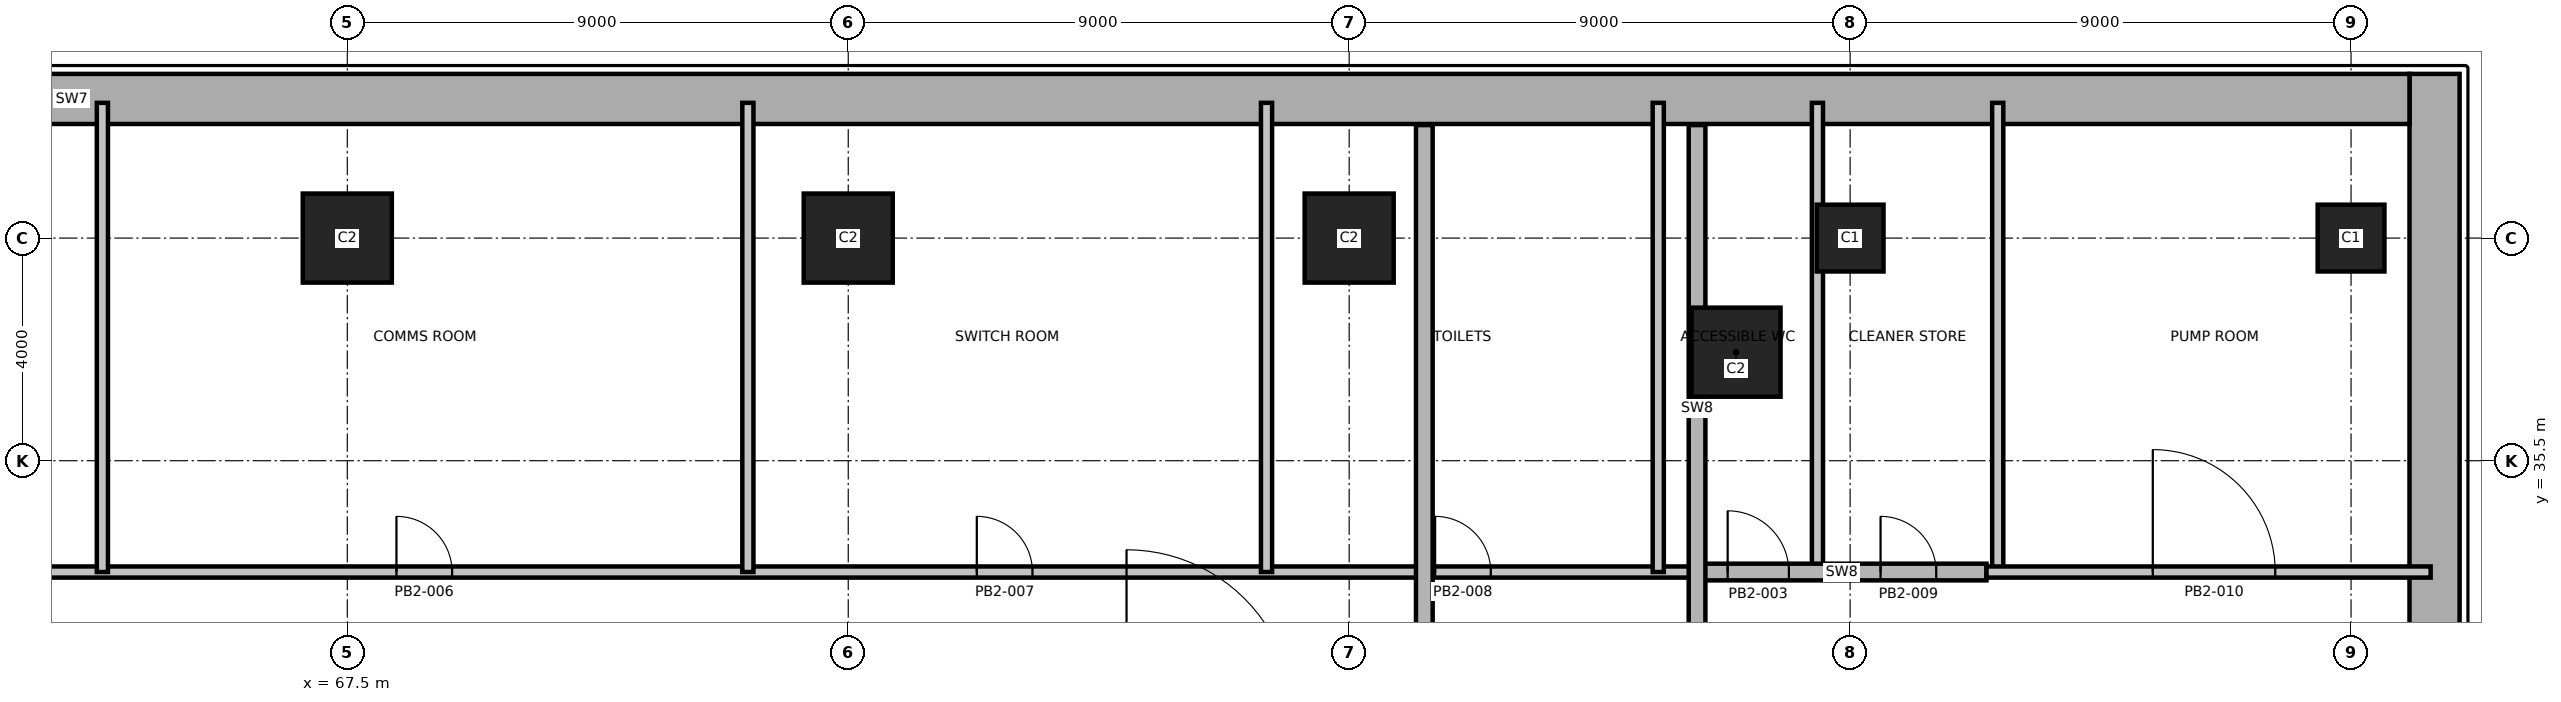
"""IFC4 building model, lengths in metres.
Left out: names, types, materials, properties, quantities, classifications, styles, units other than length and angle.
Written with IfcOpenShell. Run it as: python <this file> out.ifc"""

import sys

from ifc_helpers import new_model, si_unit, direction, frame, frame_2d, origin, origin_2d, place, context, subcontext, project, spatial, rectangle, extrude, element, fill, save


model = new_model("IFC4")
c1 = context("Model", 3, precision=1e-05, world=origin(), true_north=direction((0.0, 1.0)))
c2 = subcontext(c1, "Body", "Model", "MODEL_VIEW")
j1 = project(units=[si_unit("LENGTHUNIT", "METRE"), si_unit("PLANEANGLEUNIT", "RADIAN")], contexts=[c1])
p1 = place(None, origin())
s1 = spatial("IfcSite", under=j1, at=p1, CompositionType="ELEMENT")
p2 = place(p1, origin())
s2 = spatial("IfcBuilding", under=s1, at=p2, CompositionType="ELEMENT")
p3 = place(p2, frame((0.0, 0.0, -9.0)))
s3 = spatial("IfcBuildingStorey", under=s2, at=p3, CompositionType="ELEMENT", Elevation=-9.0)
for number, where, z_axis, x_axis in (
    (1, (67.5, 39.5, 0.0), (0.0, 0.0, 1.0), (1.0, 0.0, 0.0)),
    (2, (76.5, 39.5, 0.0), (0.0, 0.0, 1.0), (1.0, 0.0, 0.0)),
    (3, (85.5, 39.5, 0.0), (0.0, 0.0, 1.0), (1.0, 0.0, 0.0)),
):
    element("IfcColumn", number, at=place(p3, frame(where, z_axis=z_axis, x_axis=x_axis)), inside=s3, PredefinedType="COLUMN", context=c2, shape_type="SweptSolid", body=[
        extrude(rectangle(XDim=1.6, YDim=1.6, at=origin_2d()), origin(), (0.0, 0.0, 1.0), 4.5),
    ])
for number, where, z_axis, x_axis in (
    (4, (94.5, 39.5, 0.0), (0.0, 0.0, 1.0), (1.0, 0.0, 0.0)),
    (5, (103.5, 39.5, 0.0), (0.0, 0.0, 1.0), (1.0, 0.0, 0.0)),
):
    element("IfcColumn", number, at=place(p3, frame(where, z_axis=z_axis, x_axis=x_axis)), inside=s3, PredefinedType="COLUMN", context=c2, shape_type="SweptSolid", body=[
        extrude(rectangle(XDim=1.2, YDim=1.2, at=origin_2d()), origin(), (0.0, 0.0, 1.0), 4.5),
    ])
p4 = place(p3, frame((92.45, 37.45, 0.0), z_axis=(0.0, 0.0, 1.0), x_axis=(1.0, 0.0, 0.0)))
e6 = element("IfcColumn", 6, at=p4, inside=s3, PredefinedType="COLUMN", context=c2, shape_type="SweptSolid", body=[
    extrude(rectangle(XDim=1.6, YDim=1.6, at=origin_2d()), origin(), (0.0, 0.0, 1.0), 4.5),
])
p5 = place(p3, frame((105.0, 0.45, 0.0), z_axis=(0.0, 0.0, 1.0), x_axis=(0.0, 1.0, 0.0)))
e7 = element("IfcWall", 7, at=p5, inside=s3, PredefinedType="SOLIDWALL", context=c2, shape_type="SweptSolid", body=[
    extrude(rectangle(XDim=42.0, YDim=0.9, at=frame_2d((21.0, 0.0))), origin(), (0.0, 0.0, 1.0), 4.5),
])
p6 = place(p3, frame((104.55, 42.0, 0.0), z_axis=(0.0, 0.0, 1.0), x_axis=(-1.0, 0.0, 0.0)))
e8 = element("IfcWall", 8, at=p6, inside=s3, PredefinedType="SOLIDWALL", context=c2, shape_type="SweptSolid", body=[
    extrude(rectangle(XDim=84.0, YDim=0.9, at=frame_2d((42.0, 0.0))), origin(), (0.0, 0.0, 1.0), 4.5),
])
p7 = place(p3, frame((61.5, 33.5, 0.0), z_axis=(0.0, 0.0, 1.0), x_axis=(1.0, 0.0, 0.0)))
e9 = element("IfcWall", 9, at=p7, inside=s3, PredefinedType="PARTITIONING", context=c2, shape_type="SweptSolid", body=[
    extrude(rectangle(XDim=30.25, YDim=0.2, at=frame_2d((15.125, 0.0))), origin(), (0.0, 0.0, 1.0), 4.2),
])
p8 = place(p7, frame((6.883, 0.0, 0.0)))
e10 = element("IfcOpeningElement", 10, at=p8, cuts=e9, PredefinedType="OPENING", context=c2, shape_type="SweptSolid", body=[
    extrude(rectangle(XDim=1.0, YDim=2.1, at=frame_2d((0.5, 1.05))), frame((0.0, 0.11, 0.0), z_axis=(0.0, -1.0, 0.0), x_axis=(1.0, 0.0, 0.0)), (0.0, 0.0, 1.0), 0.22),
])
p9 = place(p7, frame((17.31, 0.0, 0.0)))
e11 = element("IfcOpeningElement", 11, at=p9, cuts=e9, PredefinedType="OPENING", context=c2, shape_type="SweptSolid", body=[
    extrude(rectangle(XDim=1.0, YDim=2.1, at=frame_2d((0.5, 1.05))), frame((0.0, 0.11, 0.0), z_axis=(0.0, -1.0, 0.0), x_axis=(1.0, 0.0, 0.0)), (0.0, 0.0, 1.0), 0.22),
])
p10 = place(p7, frame((25.544, 0.0, 0.0)))
e12 = element("IfcOpeningElement", 12, at=p10, cuts=e9, PredefinedType="OPENING", context=c2, shape_type="SweptSolid", body=[
    extrude(rectangle(XDim=1.0, YDim=2.1, at=frame_2d((0.5, 1.05))), frame((0.0, 0.11, 0.0), z_axis=(0.0, -1.0, 0.0), x_axis=(1.0, 0.0, 0.0)), (0.0, 0.0, 1.0), 0.22),
])
for number, where, z_axis, x_axis in (
    (13, (63.1, 33.5, 0.0), (0.0, 0.0, 1.0), (0.0, 1.0, 0.0)),
    (14, (74.697, 33.5, 0.0), (0.0, 0.0, 1.0), (0.0, 1.0, 0.0)),
    (15, (84.015, 33.5, 0.0), (0.0, 0.0, 1.0), (0.0, 1.0, 0.0)),
    (16, (91.053, 33.5, 0.0), (0.0, 0.0, 1.0), (0.0, 1.0, 0.0)),
    (17, (93.913, 33.5, 0.0), (0.0, 0.0, 1.0), (0.0, 1.0, 0.0)),
    (18, (97.152, 33.5, 0.0), (0.0, 0.0, 1.0), (0.0, 1.0, 0.0)),
):
    element("IfcWall", number, at=place(p3, frame(where, z_axis=z_axis, x_axis=x_axis)), inside=s3, PredefinedType="PARTITIONING", context=c2, shape_type="SweptSolid", body=[
        extrude(rectangle(XDim=8.43, YDim=0.2, at=frame_2d((4.215, 0.0))), origin(), (0.0, 0.0, 1.0), 4.2),
    ])
p11 = place(p3, frame((91.75, 33.5, 0.0), z_axis=(0.0, 0.0, 1.0), x_axis=(1.0, 0.0, 0.0)))
e19 = element("IfcWall", 19, at=p11, inside=s3, PredefinedType="SHEAR", context=c2, shape_type="SweptSolid", body=[
    extrude(rectangle(XDim=5.2, YDim=0.3, at=frame_2d((2.6, 0.0))), origin(), (0.0, 0.0, 1.0), 4.2),
])
p12 = place(p11, frame((0.55, 0.0, 0.0)))
e20 = element("IfcOpeningElement", 20, at=p12, cuts=e19, PredefinedType="OPENING", context=c2, shape_type="SweptSolid", body=[
    extrude(rectangle(XDim=1.1, YDim=2.1, at=frame_2d((0.55, 1.05))), frame((0.0, 0.16, 0.0), z_axis=(0.0, -1.0, 0.0), x_axis=(1.0, 0.0, 0.0)), (0.0, 0.0, 1.0), 0.32),
])
p13 = place(p11, frame((3.297, 0.0, 0.0)))
e21 = element("IfcOpeningElement", 21, at=p13, cuts=e19, PredefinedType="OPENING", context=c2, shape_type="SweptSolid", body=[
    extrude(rectangle(XDim=1.0, YDim=2.1, at=frame_2d((0.5, 1.05))), frame((0.0, 0.16, 0.0), z_axis=(0.0, -1.0, 0.0), x_axis=(1.0, 0.0, 0.0)), (0.0, 0.0, 1.0), 0.32),
])
p14 = place(p3, frame((86.85, 21.8, 0.0), z_axis=(0.0, 0.0, 1.0), x_axis=(0.0, 1.0, 0.0)))
e22 = element("IfcWall", 22, at=p14, inside=s3, PredefinedType="SHEAR", context=c2, shape_type="SweptSolid", body=[
    extrude(rectangle(XDim=19.73, YDim=0.3, at=frame_2d((9.865, 0.0))), origin(), (0.0, 0.0, 1.0), 4.2),
])
p15 = place(p3, frame((91.75, 31.35, 0.0), z_axis=(0.0, 0.0, 1.0), x_axis=(0.0, 1.0, 0.0)))
e23 = element("IfcWall", 23, at=p15, inside=s3, PredefinedType="SHEAR", context=c2, shape_type="SweptSolid", body=[
    extrude(rectangle(XDim=10.18, YDim=0.3, at=frame_2d((5.09, 0.0))), origin(), (0.0, 0.0, 1.0), 4.2),
])
p16 = place(p3, frame((96.95, 33.5, 0.0), z_axis=(0.0, 0.0, 1.0), x_axis=(1.0, 0.0, 0.0)))
e24 = element("IfcWall", 24, at=p16, inside=s3, PredefinedType="PARTITIONING", context=c2, shape_type="SweptSolid", body=[
    extrude(rectangle(XDim=7.98, YDim=0.2, at=frame_2d((3.99, 0.0))), origin(), (0.0, 0.0, 1.0), 4.2),
])
p17 = place(p16, frame((2.988, 0.0, 0.0)))
e25 = element("IfcOpeningElement", 25, at=p17, cuts=e24, PredefinedType="OPENING", context=c2, shape_type="SweptSolid", body=[
    extrude(rectangle(XDim=2.2, YDim=2.4, at=frame_2d((1.1, 1.2))), frame((0.0, 0.11, 0.0), z_axis=(0.0, -1.0, 0.0), x_axis=(1.0, 0.0, 0.0)), (0.0, 0.0, 1.0), 0.22),
])
p18 = place(p12, origin())
e26 = element("IfcDoor", 26, at=p18, inside=s3, OperationType="SINGLE_SWING_LEFT", PredefinedType="DOOR", context=c2, shape_type="SweptSolid", body=[
    extrude(rectangle(XDim=1.1, YDim=2.1, at=frame_2d((0.55, 1.05))), frame((0.0, 0.025, 0.0), z_axis=(0.0, -1.0, 0.0), x_axis=(1.0, 0.0, 0.0)), (0.0, 0.0, 1.0), 0.05),
])
fill(e20, e26)
p19 = place(p8, origin())
e27 = element("IfcDoor", 27, at=p19, inside=s3, OperationType="SINGLE_SWING_RIGHT", PredefinedType="DOOR", context=c2, shape_type="SweptSolid", body=[
    extrude(rectangle(XDim=1.0, YDim=2.1, at=frame_2d((0.5, 1.05))), frame((0.0, 0.025, 0.0), z_axis=(0.0, -1.0, 0.0), x_axis=(1.0, 0.0, 0.0)), (0.0, 0.0, 1.0), 0.05),
])
fill(e10, e27)
p20 = place(p9, origin())
e28 = element("IfcDoor", 28, at=p20, inside=s3, OperationType="SINGLE_SWING_LEFT", PredefinedType="DOOR", context=c2, shape_type="SweptSolid", body=[
    extrude(rectangle(XDim=1.0, YDim=2.1, at=frame_2d((0.5, 1.05))), frame((0.0, 0.025, 0.0), z_axis=(0.0, -1.0, 0.0), x_axis=(1.0, 0.0, 0.0)), (0.0, 0.0, 1.0), 0.05),
])
fill(e11, e28)
p21 = place(p10, origin())
e29 = element("IfcDoor", 29, at=p21, inside=s3, OperationType="SINGLE_SWING_RIGHT", PredefinedType="DOOR", context=c2, shape_type="SweptSolid", body=[
    extrude(rectangle(XDim=1.0, YDim=2.1, at=frame_2d((0.5, 1.05))), frame((0.0, 0.025, 0.0), z_axis=(0.0, -1.0, 0.0), x_axis=(1.0, 0.0, 0.0)), (0.0, 0.0, 1.0), 0.05),
])
fill(e12, e29)
p22 = place(p13, origin())
e30 = element("IfcDoor", 30, at=p22, inside=s3, OperationType="SINGLE_SWING_LEFT", PredefinedType="DOOR", context=c2, shape_type="SweptSolid", body=[
    extrude(rectangle(XDim=1.0, YDim=2.1, at=frame_2d((0.5, 1.05))), frame((0.0, 0.025, 0.0), z_axis=(0.0, -1.0, 0.0), x_axis=(1.0, 0.0, 0.0)), (0.0, 0.0, 1.0), 0.05),
])
fill(e21, e30)
p23 = place(p17, origin())
e31 = element("IfcDoor", 31, at=p23, inside=s3, OperationType="SINGLE_SWING_RIGHT", PredefinedType="DOOR", context=c2, shape_type="SweptSolid", body=[
    extrude(rectangle(XDim=2.2, YDim=2.4, at=frame_2d((1.1, 1.2))), frame((0.0, 0.025, 0.0), z_axis=(0.0, -1.0, 0.0), x_axis=(1.0, 0.0, 0.0)), (0.0, 0.0, 1.0), 0.05),
])
fill(e25, e31)
save(model, sys.argv[1])
